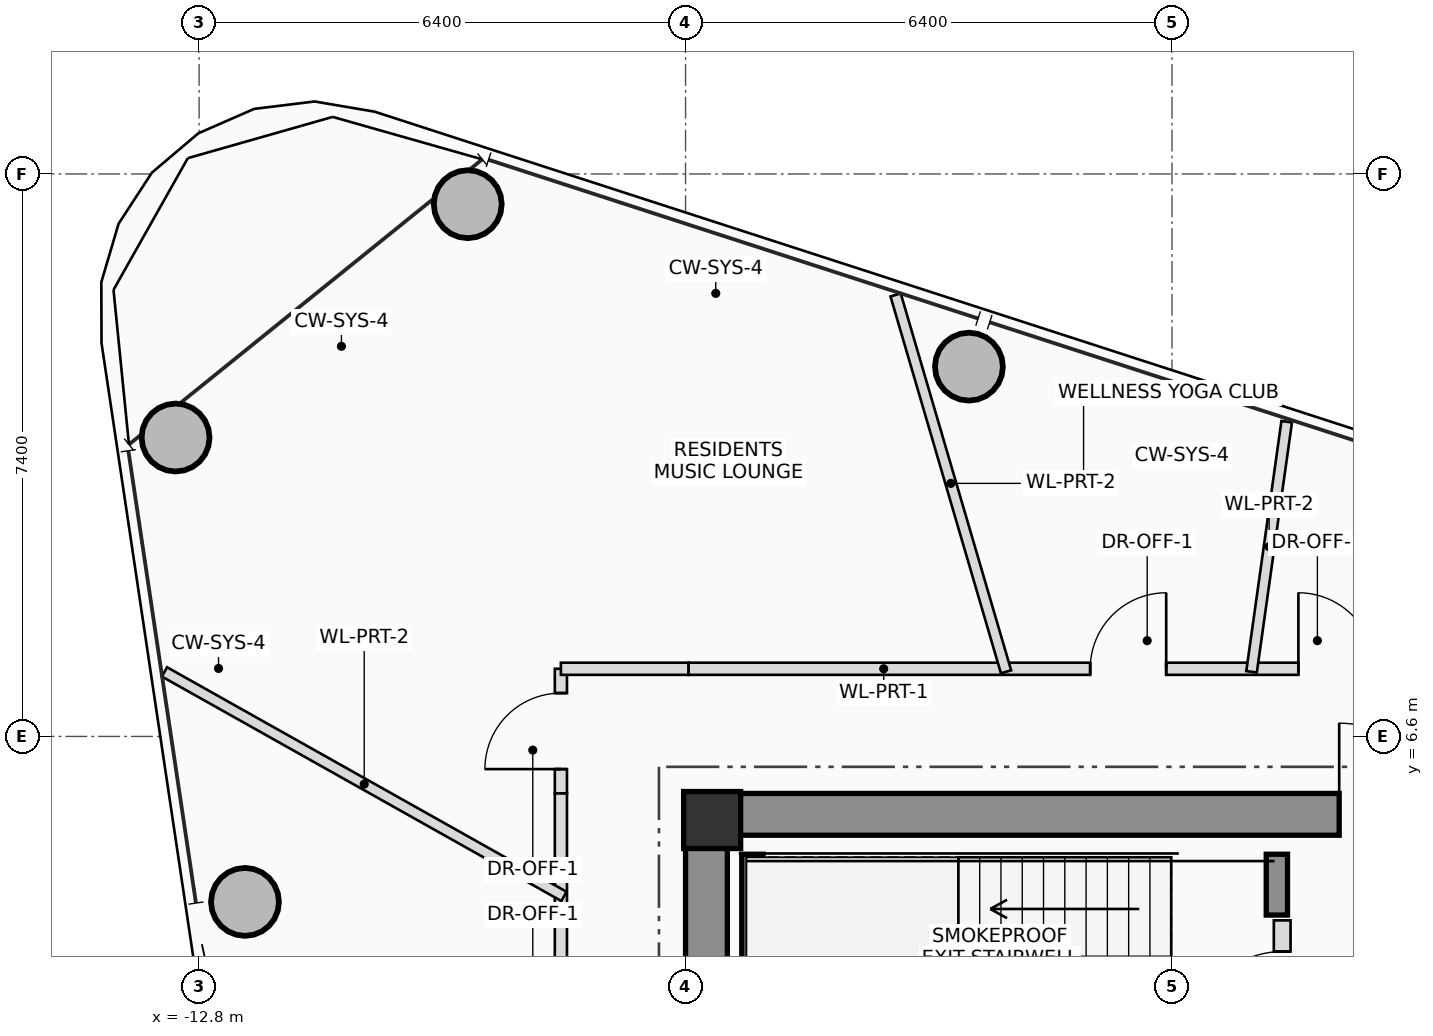
"""IFC4 building model, lengths in metres.
Left out: names, types, materials, properties, quantities, classifications, styles, units other than length and angle.
Written with IfcOpenShell. Run it as: python <this file> out.ifc"""

import sys

from ifc_helpers import new_model, si_unit, direction, frame, frame_2d, origin, origin_2d, place, context, subcontext, project, spatial, rectangle, hollow_circle, extrude, source, transform, mapped, element, fill, save


model = new_model("IFC4")
c1 = context("Model", 3, precision=1e-05, world=origin(), true_north=direction((0.0, 1.0)))
c2 = subcontext(c1, "Body", "Model", "MODEL_VIEW")
j1 = project(units=[si_unit("LENGTHUNIT", "METRE"), si_unit("PLANEANGLEUNIT", "RADIAN")], contexts=[c1])
p1 = place(None, origin())
s1 = spatial("IfcSite", under=j1, at=p1, CompositionType="ELEMENT")
p2 = place(p1, origin())
s2 = spatial("IfcBuilding", under=s1, at=p2, CompositionType="ELEMENT")
p3 = place(p2, frame((0.0, 0.0, 257.55)))
s3 = spatial("IfcBuildingStorey", under=s2, at=p3, CompositionType="ELEMENT", Elevation=257.55)
m1 = source(origin(), c2, "Body", "SweptSolid", [
    extrude(rectangle(XDim=0.75, YDim=0.75, at=origin_2d()), origin(), (0.0, 0.0, 1.0), 3.4),
])
p4 = place(p3, frame((-6.05, 5.5, 0.0), z_axis=(0.0, 0.0, 1.0), x_axis=(1.0, 0.0, 0.0)))
e1 = element("IfcColumn", 1, at=p4, inside=s3, PredefinedType="COLUMN", context=c2, shape_type="MappedRepresentation", body=[
    mapped(m1, transform((0.0, 0.0, 0.0), scale=1.0)),
])
p5 = place(p3, frame((-6.4, 5.575, 0.0), z_axis=(0.0, 0.0, 1.0), x_axis=(1.0, 0.0, 0.0)))
e2 = element("IfcWall", 2, at=p5, inside=s3, PredefinedType="SHEAR", context=c2, shape_type="SweptSolid", body=[
    extrude(rectangle(XDim=12.8, YDim=0.55, at=frame_2d((6.4, 0.0))), origin(), (0.0, 0.0, 1.0), 3.4),
])
p6 = place(p5, frame((8.6, 0.0, 0.0)))
e3 = element("IfcOpeningElement", 3, at=p6, cuts=e2, PredefinedType="OPENING", context=c2, shape_type="SweptSolid", body=[
    extrude(rectangle(XDim=1.2, YDim=2.2, at=frame_2d((0.6, 1.1))), frame((0.0, 0.285, 0.0), z_axis=(0.0, -1.0, 0.0), x_axis=(1.0, 0.0, 0.0)), (0.0, 0.0, 1.0), 0.57),
])
p7 = place(p3, frame((-6.125, 1.75, 0.0), z_axis=(0.0, 0.0, 1.0), x_axis=(0.0, 1.0, 0.0)))
e4 = element("IfcWall", 4, at=p7, inside=s3, PredefinedType="SHEAR", context=c2, shape_type="SweptSolid", body=[
    extrude(rectangle(XDim=3.55, YDim=0.55, at=frame_2d((1.775, 0.0))), origin(), (0.0, 0.0, 1.0), 3.4),
])
p8 = place(p3, frame((-5.52, 2.3, 0.0), z_axis=(0.0, 0.0, 1.0), x_axis=(0.0, 1.0, 0.0)))
e5 = element("IfcWall", 5, at=p8, inside=s3, PredefinedType="SHEAR", context=c2, shape_type="SweptSolid", body=[
    extrude(rectangle(XDim=2.75, YDim=0.28, at=frame_2d((1.375, 0.0))), origin(), (0.0, 0.0, 1.0), 3.4),
])
p9 = place(p3, frame((1.38, 4.25, 0.0), z_axis=(0.0, 0.0, 1.0), x_axis=(0.0, 1.0, 0.0)))
e6 = element("IfcWall", 6, at=p9, inside=s3, PredefinedType="SHEAR", context=c2, shape_type="SweptSolid", body=[
    extrude(rectangle(XDim=0.8, YDim=0.28, at=frame_2d((0.4, 0.0))), origin(), (0.0, 0.0, 1.0), 3.4),
])
m2 = source(origin(), c2, "Body", "SweptSolid", [
    extrude(hollow_circle(Radius=0.45, WallThickness=0.032, at=origin_2d()), origin(), (0.0, 0.0, 1.0), 3.4),
])
for number, where, z_axis, x_axis in (
    (7, (-2.672, 11.465, 0.0), (0.0, 0.0, 1.0), (1.0, 0.0, 0.0)),
    (8, (-9.266, 13.602, 0.0), (0.0, 0.0, 1.0), (1.0, 0.0, 0.0)),
    (9, (-13.11, 10.532, 0.0), (0.0, 0.0, 1.0), (1.0, 0.0, 0.0)),
    (10, (-12.197, 4.423, 0.0), (0.0, 0.0, 1.0), (1.0, 0.0, 0.0)),
):
    element("IfcColumn", number, at=place(p3, frame(where, z_axis=z_axis, x_axis=x_axis)), inside=s3, PredefinedType="COLUMN", context=c2, shape_type="MappedRepresentation", body=[
        mapped(m2, transform((0.0, 0.0, 0.0), scale=1.0)),
    ])
p10 = place(p3, frame((1.45, 2.2, 0.0), z_axis=(0.0, 0.0, 1.0), x_axis=(0.0, 1.0, 0.0)))
e11 = element("IfcWall", 11, at=p10, inside=s3, PredefinedType="PLUMBINGWALL", context=c2, shape_type="SweptSolid", body=[
    extrude(rectangle(XDim=1.98, YDim=0.22, at=frame_2d((0.99, 0.0))), origin(), (0.0, 0.0, 1.0), 3.2),
])
p11 = place(p10, frame((0.42, 0.0, 0.0)))
e12 = element("IfcOpeningElement", 12, at=p11, cuts=e11, PredefinedType="OPENING", context=c2, shape_type="SweptSolid", body=[
    extrude(rectangle(XDim=1.15, YDim=2.15, at=frame_2d((0.575, 1.075))), frame((0.0, 0.12, 0.0), z_axis=(0.0, -1.0, 0.0), x_axis=(1.0, 0.0, 0.0)), (0.0, 0.0, 1.0), 0.24),
])
p12 = place(p3, frame((-8.04, 5.85, 0.0), z_axis=(0.0, 0.0, 1.0), x_axis=(0.0, 1.0, 0.0)))
e13 = element("IfcWall", 13, at=p12, inside=s3, PredefinedType="PARTITIONING", context=c2, shape_type="SweptSolid", body=[
    extrude(rectangle(XDim=1.64, YDim=0.16, at=frame_2d((0.82, 0.0))), origin(), (0.0, 0.0, 1.0), 2.605),
])
p13 = place(p12, frame((0.32, 0.0, 0.0)))
e14 = element("IfcOpeningElement", 14, at=p13, cuts=e13, PredefinedType="OPENING", context=c2, shape_type="SweptSolid", body=[
    extrude(rectangle(XDim=1.0, YDim=2.25, at=frame_2d((0.5, 1.125))), frame((0.0, 0.09, 0.0), z_axis=(0.0, -1.0, 0.0), x_axis=(1.0, 0.0, 0.0)), (0.0, 0.0, 1.0), 0.18),
])
p14 = place(p3, frame((-8.04, 7.49, 0.0), z_axis=(0.0, 0.0, 1.0), x_axis=(1.0, 0.0, 0.0)))
e15 = element("IfcWall", 15, at=p14, inside=s3, PredefinedType="PARTITIONING", context=c2, shape_type="SweptSolid", body=[
    extrude(rectangle(XDim=1.68, YDim=0.16, at=frame_2d((0.84, 0.0))), origin(), (0.0, 0.0, 1.0), 2.605),
])
p15 = place(p3, frame((-6.36, 7.49, 0.0), z_axis=(0.0, 0.0, 1.0), x_axis=(1.0, 0.0, 0.0)))
e16 = element("IfcWall", 16, at=p15, inside=s3, PredefinedType="PARTITIONING", context=c2, shape_type="SweptSolid", body=[
    extrude(rectangle(XDim=9.81, YDim=0.16, at=frame_2d((4.905, 0.0))), origin(), (0.0, 0.0, 1.0), 2.605),
])
p16 = place(p15, frame((5.284, 0.0, 0.0)))
e17 = element("IfcOpeningElement", 17, at=p16, cuts=e16, PredefinedType="OPENING", context=c2, shape_type="SweptSolid", body=[
    extrude(rectangle(XDim=1.0, YDim=2.25, at=frame_2d((0.5, 1.125))), frame((0.0, 0.09, 0.0), z_axis=(0.0, -1.0, 0.0), x_axis=(1.0, 0.0, 0.0)), (0.0, 0.0, 1.0), 0.18),
])
p17 = place(p15, frame((8.023, 0.0, 0.0)))
e18 = element("IfcOpeningElement", 18, at=p17, cuts=e16, PredefinedType="OPENING", context=c2, shape_type="SweptSolid", body=[
    extrude(rectangle(XDim=1.0, YDim=2.25, at=frame_2d((0.5, 1.125))), frame((0.0, 0.09, 0.0), z_axis=(0.0, -1.0, 0.0), x_axis=(1.0, 0.0, 0.0)), (0.0, 0.0, 1.0), 0.18),
])
p18 = place(p3, frame((-8.04, -5.85, 0.0), z_axis=(0.0, 0.0, 1.0), x_axis=(0.0, 1.0, 0.0)))
e19 = element("IfcWall", 19, at=p18, inside=s3, PredefinedType="PARTITIONING", context=c2, shape_type="SweptSolid", body=[
    extrude(rectangle(XDim=11.7, YDim=0.16, at=frame_2d((5.85, 0.0))), origin(), (0.0, 0.0, 1.0), 2.605),
])
p19 = place(p18, frame((2.661, 0.0, 0.0)))
e20 = element("IfcOpeningElement", 20, at=p19, cuts=e19, PredefinedType="OPENING", context=c2, shape_type="SweptSolid", body=[
    extrude(rectangle(XDim=1.0, YDim=2.25, at=frame_2d((0.5, 1.125))), frame((0.0, 0.09, 0.0), z_axis=(0.0, -1.0, 0.0), x_axis=(1.0, 0.0, 0.0)), (0.0, 0.0, 1.0), 0.18),
])
p20 = place(p18, frame((7.771, 0.0, 0.0)))
e21 = element("IfcOpeningElement", 21, at=p20, cuts=e19, PredefinedType="OPENING", context=c2, shape_type="SweptSolid", body=[
    extrude(rectangle(XDim=1.0, YDim=2.25, at=frame_2d((0.5, 1.125))), frame((0.0, 0.09, 0.0), z_axis=(0.0, -1.0, 0.0), x_axis=(1.0, 0.0, 0.0)), (0.0, 0.0, 1.0), 0.18),
])
p21 = place(p3, frame((1.047, 7.45, 0.0), z_axis=(0.0, 0.0, 1.0), x_axis=(0.13916814145, 0.990268765743, 0.0)))
e22 = element("IfcWall", 22, at=p21, inside=s3, PredefinedType="PARTITIONING", context=c2, shape_type="SweptSolid", body=[
    extrude(rectangle(XDim=3.323, YDim=0.14, at=frame_2d((1.661, 0.0))), origin(), (0.0, 0.0, 1.0), 2.765),
])
p22 = place(p3, frame((-2.183, 7.45, 0.0), z_axis=(0.0, 0.0, 1.0), x_axis=(-0.281242676509, 0.95963667964, 0.0)))
e23 = element("IfcWall", 23, at=p22, inside=s3, PredefinedType="PARTITIONING", context=c2, shape_type="SweptSolid", body=[
    extrude(rectangle(XDim=5.167, YDim=0.14, at=frame_2d((2.583, 0.0))), origin(), (0.0, 0.0, 1.0), 2.605),
])
p23 = place(p3, frame((-8.0, 4.496, 0.0), z_axis=(0.0, 0.0, 1.0), x_axis=(-0.871799326596, 0.489863179008, 0.0)))
e24 = element("IfcWall", 24, at=p23, inside=s3, PredefinedType="PARTITIONING", context=c2, shape_type="SweptSolid", body=[
    extrude(rectangle(XDim=6.029, YDim=0.14, at=frame_2d((3.014, 0.0))), origin(), (0.0, 0.0, 1.0), 2.605),
])
p24 = place(p6, origin())
e25 = element("IfcDoor", 25, at=p24, inside=s3, OperationType="SINGLE_SWING_LEFT", PredefinedType="DOOR", context=c2, shape_type="SweptSolid", body=[
    extrude(rectangle(XDim=1.2, YDim=2.2, at=frame_2d((0.6, 1.1))), frame((0.0, 0.025, 0.0), z_axis=(0.0, -1.0, 0.0), x_axis=(1.0, 0.0, 0.0)), (0.0, 0.0, 1.0), 0.05),
])
fill(e3, e25)
p25 = place(p11, origin())
e26 = element("IfcDoor", 26, at=p25, inside=s3, OperationType="SINGLE_SWING_LEFT", PredefinedType="DOOR", context=c2, shape_type="SweptSolid", body=[
    extrude(rectangle(XDim=1.15, YDim=2.15, at=frame_2d((0.575, 1.075))), frame((0.0, 0.025, 0.0), z_axis=(0.0, -1.0, 0.0), x_axis=(1.0, 0.0, 0.0)), (0.0, 0.0, 1.0), 0.05),
])
fill(e12, e26)
p26 = place(p13, origin())
e27 = element("IfcDoor", 27, at=p26, inside=s3, OperationType="SINGLE_SWING_LEFT", PredefinedType="DOOR", context=c2, shape_type="SweptSolid", body=[
    extrude(rectangle(XDim=1.0, YDim=2.25, at=frame_2d((0.5, 1.125))), frame((0.0, 0.025, 0.0), z_axis=(0.0, -1.0, 0.0), x_axis=(1.0, 0.0, 0.0)), (0.0, 0.0, 1.0), 0.05),
])
fill(e14, e27)
p27 = place(p16, origin())
e28 = element("IfcDoor", 28, at=p27, inside=s3, OperationType="SINGLE_SWING_RIGHT", PredefinedType="DOOR", context=c2, shape_type="SweptSolid", body=[
    extrude(rectangle(XDim=1.0, YDim=2.25, at=frame_2d((0.5, 1.125))), frame((0.0, 0.025, 0.0), z_axis=(0.0, -1.0, 0.0), x_axis=(1.0, 0.0, 0.0)), (0.0, 0.0, 1.0), 0.05),
])
fill(e17, e28)
p28 = place(p17, origin())
e29 = element("IfcDoor", 29, at=p28, inside=s3, OperationType="SINGLE_SWING_LEFT", PredefinedType="DOOR", context=c2, shape_type="SweptSolid", body=[
    extrude(rectangle(XDim=1.0, YDim=2.25, at=frame_2d((0.5, 1.125))), frame((0.0, 0.025, 0.0), z_axis=(0.0, -1.0, 0.0), x_axis=(1.0, 0.0, 0.0)), (0.0, 0.0, 1.0), 0.05),
])
fill(e18, e29)
save(model, sys.argv[1])
